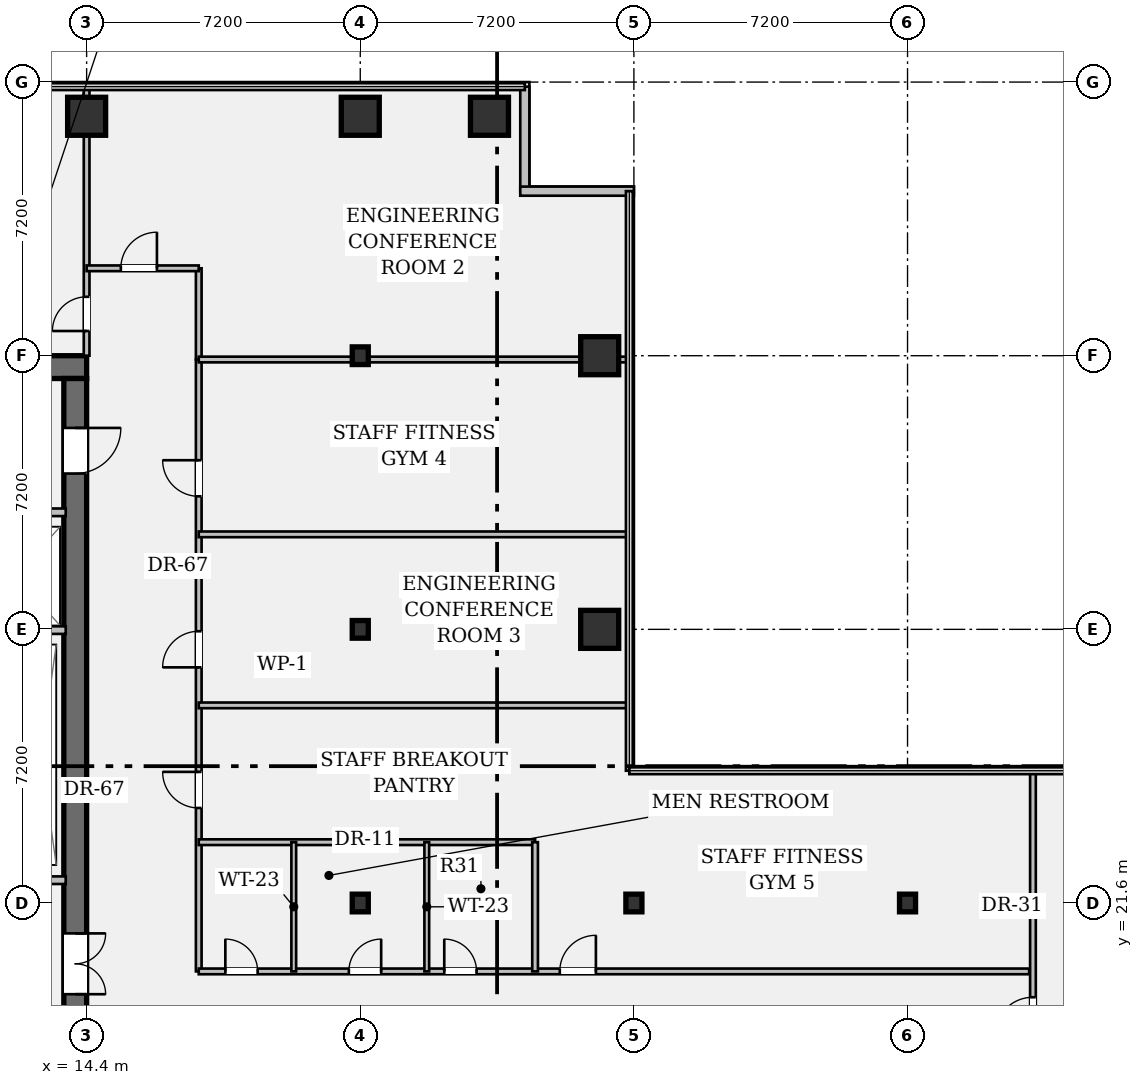
"""IFC4 building model, lengths in metres.
Left out: names, types, materials, properties, quantities, classifications, styles, units other than length and angle.
Written with IfcOpenShell. Run it as: python <this file> out.ifc"""

import sys

from ifc_helpers import new_model, si_unit, direction, frame, frame_2d, origin, origin_2d, place, context, subcontext, project, spatial, rectangle, hollow_rectangle, i_section, extrude, element, fill, save


model = new_model("IFC4")
c1 = context("Model", 3, precision=1e-05, world=origin(), true_north=direction((0.0, 1.0)))
c2 = subcontext(c1, "Body", "Model", "MODEL_VIEW")
j1 = project(units=[si_unit("LENGTHUNIT", "METRE"), si_unit("PLANEANGLEUNIT", "RADIAN")], contexts=[c1])
p1 = place(None, origin())
s1 = spatial("IfcSite", under=j1, at=p1, CompositionType="ELEMENT")
p2 = place(p1, origin())
s2 = spatial("IfcBuilding", under=s1, at=p2, CompositionType="ELEMENT")
p3 = place(p2, frame((0.0, 0.0, 69.65)))
s3 = spatial("IfcBuildingStorey", under=s2, at=p3, CompositionType="ELEMENT", Elevation=69.65)
p4 = place(p3, frame((0.6, 35.7, 0.0), z_axis=(0.0, 0.0, 1.0), x_axis=(1.0, 0.0, 0.0)))
e1 = element("IfcWall", 1, at=p4, inside=s3, PredefinedType="SHEAR", context=c2, shape_type="SweptSolid", body=[
    extrude(rectangle(XDim=13.8, YDim=0.6, at=frame_2d((6.9, 0.0))), origin(), (0.0, 0.0, 1.0), 3.57),
])
p5 = place(p3, frame((14.1, 35.4, 0.0), z_axis=(0.0, 0.0, 1.0), x_axis=(0.0, -1.0, 0.0)))
e2 = element("IfcWall", 2, at=p5, inside=s3, PredefinedType="SHEAR", context=c2, shape_type="SweptSolid", body=[
    extrude(rectangle(XDim=27.6, YDim=0.6, at=frame_2d((13.8, 0.0))), origin(), (0.0, 0.0, 1.0), 3.57),
])
p6 = place(p5, frame((1.3, 0.0, 0.0)))
e3 = element("IfcOpeningElement", 3, at=p6, cuts=e2, PredefinedType="OPENING", context=c2, shape_type="SweptSolid", body=[
    extrude(rectangle(XDim=1.2, YDim=2.15, at=frame_2d((0.6, 1.075))), frame((0.0, 0.312, 0.0), z_axis=(0.0, -1.0, 0.0), x_axis=(1.0, 0.0, 0.0)), (0.0, 0.0, 1.0), 0.624),
])
p7 = place(p5, frame((25.25, 0.0, 0.0)))
e4 = element("IfcOpeningElement", 4, at=p7, cuts=e2, PredefinedType="OPENING", context=c2, shape_type="SweptSolid", body=[
    extrude(rectangle(XDim=1.2, YDim=2.15, at=frame_2d((0.6, 1.075))), frame((0.0, 0.312, 0.0), z_axis=(0.0, -1.0, 0.0), x_axis=(1.0, 0.0, 0.0)), (0.0, 0.0, 1.0), 0.624),
])
p8 = place(p5, frame((14.6, 0.0, 0.0)))
e5 = element("IfcOpeningElement", 5, at=p8, cuts=e2, PredefinedType="OPENING", context=c2, shape_type="SweptSolid", body=[
    extrude(rectangle(XDim=1.6, YDim=2.2, at=frame_2d((0.8, 1.1))), frame((0.0, 0.312, 0.0), z_axis=(0.0, -1.0, 0.0), x_axis=(1.0, 0.0, 0.0)), (0.0, 0.0, 1.0), 0.624),
])
p9 = place(p3, frame((14.4, 42.3, 0.0), z_axis=(0.0, 0.0, 1.0), x_axis=(1.0, 0.0, 0.0)))
e6 = element("IfcColumn", 6, at=p9, inside=s3, PredefinedType="COLUMN", context=c2, shape_type="SweptSolid", body=[
    extrude(hollow_rectangle(XDim=1.0, YDim=1.0, WallThickness=0.065, at=origin_2d()), origin(), (0.0, 0.0, 1.0), 3.57),
])
for number, where, z_axis, x_axis in (
    (7, (21.6, 21.6, 0.0), (0.0, 0.0, 1.0), (1.0, 0.0, 0.0)),
    (8, (21.6, 28.8, 0.0), (0.0, 0.0, 1.0), (1.0, 0.0, 0.0)),
    (9, (21.6, 36.0, 0.0), (0.0, 0.0, 1.0), (1.0, 0.0, 0.0)),
):
    element("IfcColumn", number, at=place(p3, frame(where, z_axis=z_axis, x_axis=x_axis)), inside=s3, PredefinedType="COLUMN", context=c2, shape_type="SweptSolid", body=[
        extrude(i_section(OverallWidth=0.422, OverallDepth=0.465, WebThickness=0.045, FlangeThickness=0.073, FilletRadius=0.018, at=origin_2d()), origin(), (0.0, 0.0, 1.0), 3.57),
    ])
for number, where, z_axis, x_axis in (
    (10, (21.6, 42.3, 0.0), (0.0, 0.0, 1.0), (1.0, 0.0, 0.0)),
    (11, (25.0, 42.3, 0.0), (0.0, 0.0, 1.0), (1.0, 0.0, 0.0)),
    (12, (27.9, 28.8, 0.0), (0.0, 0.0, 1.0), (1.0, 0.0, 0.0)),
    (13, (27.9, 36.0, 0.0), (0.0, 0.0, 1.0), (1.0, 0.0, 0.0)),
):
    element("IfcColumn", number, at=place(p3, frame(where, z_axis=z_axis, x_axis=x_axis)), inside=s3, PredefinedType="COLUMN", context=c2, shape_type="SweptSolid", body=[
        extrude(hollow_rectangle(XDim=1.0, YDim=1.0, WallThickness=0.065, at=origin_2d()), origin(), (0.0, 0.0, 1.0), 3.57),
    ])
for number, where, z_axis, x_axis in (
    (14, (28.8, 21.6, 0.0), (0.0, 0.0, 1.0), (1.0, 0.0, 0.0)),
    (15, (36.0, 21.6, 0.0), (0.0, 0.0, 1.0), (1.0, 0.0, 0.0)),
):
    element("IfcColumn", number, at=place(p3, frame(where, z_axis=z_axis, x_axis=x_axis)), inside=s3, PredefinedType="COLUMN", context=c2, shape_type="SweptSolid", body=[
        extrude(i_section(OverallWidth=0.422, OverallDepth=0.465, WebThickness=0.045, FlangeThickness=0.073, FilletRadius=0.018, at=origin_2d()), origin(), (0.0, 0.0, 1.0), 3.57),
    ])
p10 = place(p3, frame((25.93, 43.08, 0.0), z_axis=(0.0, 0.0, 1.0), x_axis=(0.0, -1.0, 0.0)))
e16 = element("IfcWall", 16, at=p10, inside=s3, PredefinedType="STANDARD", context=c2, shape_type="SweptSolid", body=[
    extrude(rectangle(XDim=2.75, YDim=0.24, at=frame_2d((1.375, 0.0))), origin(), (0.0, 0.0, 1.0), 3.57),
])
p11 = place(p3, frame((25.81, 40.33, 0.0), z_axis=(0.0, 0.0, 1.0), x_axis=(1.0, 0.0, 0.0)))
e17 = element("IfcWall", 17, at=p11, inside=s3, PredefinedType="STANDARD", context=c2, shape_type="SweptSolid", body=[
    extrude(rectangle(XDim=2.99, YDim=0.24, at=frame_2d((1.495, 0.0))), origin(), (0.0, 0.0, 1.0), 3.57),
])
p12 = place(p3, frame((8.7, 31.88, 0.0), z_axis=(0.0, 0.0, 1.0), x_axis=(1.0, 0.0, 0.0)))
e18 = element("IfcWall", 18, at=p12, inside=s3, PredefinedType="PARTITIONING", context=c2, shape_type="SweptSolid", body=[
    extrude(rectangle(XDim=5.15, YDim=0.2, at=frame_2d((2.575, 0.0))), origin(), (0.0, 0.0, 1.0), 3.57),
])
p13 = place(p12, frame((0.75, 0.0, 0.0)))
e19 = element("IfcOpeningElement", 19, at=p13, cuts=e18, PredefinedType="OPENING", context=c2, shape_type="SweptSolid", body=[
    extrude(rectangle(XDim=1.2, YDim=2.2, at=frame_2d((0.6, 1.1))), frame((0.0, 0.112, 0.0), z_axis=(0.0, -1.0, 0.0), x_axis=(1.0, 0.0, 0.0)), (0.0, 0.0, 1.0), 0.224),
])
p14 = place(p12, frame((3.25, 0.0, 0.0)))
e20 = element("IfcOpeningElement", 20, at=p14, cuts=e18, PredefinedType="OPENING", context=c2, shape_type="SweptSolid", body=[
    extrude(rectangle(XDim=1.2, YDim=2.2, at=frame_2d((0.6, 1.1))), frame((0.0, 0.112, 0.0), z_axis=(0.0, -1.0, 0.0), x_axis=(1.0, 0.0, 0.0)), (0.0, 0.0, 1.0), 0.224),
])
p15 = place(p3, frame((8.7, 28.78, 0.0), z_axis=(0.0, 0.0, 1.0), x_axis=(1.0, 0.0, 0.0)))
e21 = element("IfcWall", 21, at=p15, inside=s3, PredefinedType="PARTITIONING", context=c2, shape_type="SweptSolid", body=[
    extrude(rectangle(XDim=5.15, YDim=0.2, at=frame_2d((2.575, 0.0))), origin(), (0.0, 0.0, 1.0), 3.57),
])
p16 = place(p3, frame((7.1, 22.2, 0.0), z_axis=(0.0, 0.0, 1.0), x_axis=(1.0, 0.0, 0.0)))
e22 = element("IfcWall", 22, at=p16, inside=s3, PredefinedType="PARTITIONING", context=c2, shape_type="SweptSolid", body=[
    extrude(rectangle(XDim=6.75, YDim=0.2, at=frame_2d((3.375, 0.0))), origin(), (0.0, 0.0, 1.0), 3.57),
])
p17 = place(p3, frame((17.35, 19.8, 0.0), z_axis=(0.0, 0.0, 1.0), x_axis=(0.0, 1.0, 0.0)))
e23 = element("IfcWall", 23, at=p17, inside=s3, PredefinedType="PARTITIONING", context=c2, shape_type="SweptSolid", body=[
    extrude(rectangle(XDim=16.1, YDim=0.15, at=frame_2d((8.05, 0.0))), origin(), (0.0, 0.0, 1.0), 2.699),
])
p18 = place(p17, frame((4.3, 0.0, 0.0)))
e24 = element("IfcOpeningElement", 24, at=p18, cuts=e23, PredefinedType="OPENING", context=c2, shape_type="SweptSolid", body=[
    extrude(rectangle(XDim=0.95, YDim=2.15, at=frame_2d((0.475, 1.075))), frame((0.0, 0.087, 0.0), z_axis=(0.0, -1.0, 0.0), x_axis=(1.0, 0.0, 0.0)), (0.0, 0.0, 1.0), 0.174),
])
p19 = place(p17, frame((8.0, 0.0, 0.0)))
e25 = element("IfcOpeningElement", 25, at=p19, cuts=e23, PredefinedType="OPENING", context=c2, shape_type="SweptSolid", body=[
    extrude(rectangle(XDim=0.95, YDim=2.15, at=frame_2d((0.475, 1.075))), frame((0.0, 0.087, 0.0), z_axis=(0.0, -1.0, 0.0), x_axis=(1.0, 0.0, 0.0)), (0.0, 0.0, 1.0), 0.174),
])
p20 = place(p17, frame((12.5, 0.0, 0.0)))
e26 = element("IfcOpeningElement", 26, at=p20, cuts=e23, PredefinedType="OPENING", context=c2, shape_type="SweptSolid", body=[
    extrude(rectangle(XDim=0.95, YDim=2.15, at=frame_2d((0.475, 1.075))), frame((0.0, 0.087, 0.0), z_axis=(0.0, -1.0, 0.0), x_axis=(1.0, 0.0, 0.0)), (0.0, 0.0, 1.0), 0.174),
])
p21 = place(p3, frame((17.35, 19.8, 0.0), z_axis=(0.0, 0.0, 1.0), x_axis=(1.0, 0.0, 0.0)))
e27 = element("IfcWall", 27, at=p21, inside=s3, PredefinedType="PARTITIONING", context=c2, shape_type="SweptSolid", body=[
    extrude(rectangle(XDim=21.85, YDim=0.15, at=frame_2d((10.925, 0.0))), origin(), (0.0, 0.0, 1.0), 2.699),
])
p22 = place(p21, frame((0.7, 0.0, 0.0)))
e28 = element("IfcOpeningElement", 28, at=p22, cuts=e27, PredefinedType="OPENING", context=c2, shape_type="SweptSolid", body=[
    extrude(rectangle(XDim=0.85, YDim=2.15, at=frame_2d((0.425, 1.075))), frame((0.0, 0.087, 0.0), z_axis=(0.0, -1.0, 0.0), x_axis=(1.0, 0.0, 0.0)), (0.0, 0.0, 1.0), 0.174),
])
p23 = place(p21, frame((3.95, 0.0, 0.0)))
e29 = element("IfcOpeningElement", 29, at=p23, cuts=e27, PredefinedType="OPENING", context=c2, shape_type="SweptSolid", body=[
    extrude(rectangle(XDim=0.85, YDim=2.15, at=frame_2d((0.425, 1.075))), frame((0.0, 0.087, 0.0), z_axis=(0.0, -1.0, 0.0), x_axis=(1.0, 0.0, 0.0)), (0.0, 0.0, 1.0), 0.174),
])
p24 = place(p21, frame((6.46, 0.0, 0.0)))
e30 = element("IfcOpeningElement", 30, at=p24, cuts=e27, PredefinedType="OPENING", context=c2, shape_type="SweptSolid", body=[
    extrude(rectangle(XDim=0.85, YDim=2.15, at=frame_2d((0.425, 1.075))), frame((0.0, 0.087, 0.0), z_axis=(0.0, -1.0, 0.0), x_axis=(1.0, 0.0, 0.0)), (0.0, 0.0, 1.0), 0.174),
])
p25 = place(p21, frame((9.5, 0.0, 0.0)))
e31 = element("IfcOpeningElement", 31, at=p25, cuts=e27, PredefinedType="OPENING", context=c2, shape_type="SweptSolid", body=[
    extrude(rectangle(XDim=0.95, YDim=2.15, at=frame_2d((0.475, 1.075))), frame((0.0, 0.087, 0.0), z_axis=(0.0, -1.0, 0.0), x_axis=(1.0, 0.0, 0.0)), (0.0, 0.0, 1.0), 0.174),
])
p26 = place(p3, frame((39.3, 0.12, 0.0), z_axis=(0.0, 0.0, 1.0), x_axis=(0.0, 1.0, 0.0)))
e32 = element("IfcWall", 32, at=p26, inside=s3, PredefinedType="PARTITIONING", context=c2, shape_type="SweptSolid", body=[
    extrude(rectangle(XDim=24.96, YDim=0.15, at=frame_2d((12.48, 0.0))), origin(), (0.0, 0.0, 1.0), 2.699),
])
p27 = place(p26, frame((18.0, 0.0, 0.0)))
e33 = element("IfcOpeningElement", 33, at=p27, cuts=e32, PredefinedType="OPENING", context=c2, shape_type="SweptSolid", body=[
    extrude(rectangle(XDim=1.0, YDim=2.15, at=frame_2d((0.5, 1.075))), frame((0.0, 0.087, 0.0), z_axis=(0.0, -1.0, 0.0), x_axis=(1.0, 0.0, 0.0)), (0.0, 0.0, 1.0), 0.174),
])
p28 = place(p3, frame((14.4, 36.0, 0.0), z_axis=(0.0, 0.0, 1.0), x_axis=(0.0, 1.0, 0.0)))
e34 = element("IfcWall", 34, at=p28, inside=s3, PredefinedType="PARTITIONING", context=c2, shape_type="SweptSolid", body=[
    extrude(rectangle(XDim=7.08, YDim=0.15, at=frame_2d((3.54, 0.0))), origin(), (0.0, 0.0, 1.0), 2.699),
])
p29 = place(p28, frame((0.65, 0.0, 0.0)))
e35 = element("IfcOpeningElement", 35, at=p29, cuts=e34, PredefinedType="OPENING", context=c2, shape_type="SweptSolid", body=[
    extrude(rectangle(XDim=0.9, YDim=2.15, at=frame_2d((0.45, 1.075))), frame((0.0, 0.087, 0.0), z_axis=(0.0, -1.0, 0.0), x_axis=(1.0, 0.0, 0.0)), (0.0, 0.0, 1.0), 0.174),
])
p30 = place(p3, frame((17.35, 35.9, 0.0), z_axis=(0.0, 0.0, 1.0), x_axis=(0.0, 1.0, 0.0)))
e36 = element("IfcWall", 36, at=p30, inside=s3, PredefinedType="PARTITIONING", context=c2, shape_type="SweptSolid", body=[
    extrude(rectangle(XDim=2.4, YDim=0.15, at=frame_2d((1.2, 0.0))), origin(), (0.0, 0.0, 1.0), 2.699),
])
p31 = place(p3, frame((14.4, 38.3, 0.0), z_axis=(0.0, 0.0, 1.0), x_axis=(1.0, 0.0, 0.0)))
e37 = element("IfcWall", 37, at=p31, inside=s3, PredefinedType="PARTITIONING", context=c2, shape_type="SweptSolid", body=[
    extrude(rectangle(XDim=2.95, YDim=0.15, at=frame_2d((1.475, 0.0))), origin(), (0.0, 0.0, 1.0), 2.699),
])
p32 = place(p31, frame((0.9, 0.0, 0.0)))
e38 = element("IfcOpeningElement", 38, at=p32, cuts=e37, PredefinedType="OPENING", context=c2, shape_type="SweptSolid", body=[
    extrude(rectangle(XDim=0.95, YDim=2.15, at=frame_2d((0.475, 1.075))), frame((0.0, 0.087, 0.0), z_axis=(0.0, -1.0, 0.0), x_axis=(1.0, 0.0, 0.0)), (0.0, 0.0, 1.0), 0.174),
])
p33 = place(p3, frame((17.35, 35.9, 0.0), z_axis=(0.0, 0.0, 1.0), x_axis=(1.0, 0.0, 0.0)))
e39 = element("IfcWall", 39, at=p33, inside=s3, PredefinedType="PARTITIONING", context=c2, shape_type="SweptSolid", body=[
    extrude(rectangle(XDim=11.33, YDim=0.15, at=frame_2d((5.665, 0.0))), origin(), (0.0, 0.0, 1.0), 2.699),
])
p34 = place(p3, frame((17.35, 23.2, 0.0), z_axis=(0.0, 0.0, 1.0), x_axis=(1.0, 0.0, 0.0)))
e40 = element("IfcWall", 40, at=p34, inside=s3, PredefinedType="PARTITIONING", context=c2, shape_type="SweptSolid", body=[
    extrude(rectangle(XDim=8.85, YDim=0.15, at=frame_2d((4.425, 0.0))), origin(), (0.0, 0.0, 1.0), 2.699),
])
p35 = place(p3, frame((26.2, 19.8, 0.0), z_axis=(0.0, 0.0, 1.0), x_axis=(0.0, 1.0, 0.0)))
e41 = element("IfcWall", 41, at=p35, inside=s3, PredefinedType="PARTITIONING", context=c2, shape_type="SweptSolid", body=[
    extrude(rectangle(XDim=3.4, YDim=0.15, at=frame_2d((1.7, 0.0))), origin(), (0.0, 0.0, 1.0), 2.699),
])
for number, where, z_axis, x_axis in (
    (42, (19.85, 19.8, 0.0), (0.0, 0.0, 1.0), (0.0, 1.0, 0.0)),
    (43, (23.35, 19.8, 0.0), (0.0, 0.0, 1.0), (0.0, 1.0, 0.0)),
):
    element("IfcWall", number, at=place(p3, frame(where, z_axis=z_axis, x_axis=x_axis)), inside=s3, PredefinedType="PARTITIONING", context=c2, shape_type="SweptSolid", body=[
        extrude(rectangle(XDim=3.4, YDim=0.125, at=frame_2d((1.7, 0.0))), origin(), (0.0, 0.0, 1.0), 2.699),
    ])
for number, where, z_axis, x_axis in (
    (44, (17.35, 26.8, 0.0), (0.0, 0.0, 1.0), (1.0, 0.0, 0.0)),
    (45, (17.35, 31.3, 0.0), (0.0, 0.0, 1.0), (1.0, 0.0, 0.0)),
):
    element("IfcWall", number, at=place(p3, frame(where, z_axis=z_axis, x_axis=x_axis)), inside=s3, PredefinedType="PARTITIONING", context=c2, shape_type="SweptSolid", body=[
        extrude(rectangle(XDim=11.33, YDim=0.15, at=frame_2d((5.665, 0.0))), origin(), (0.0, 0.0, 1.0), 2.699),
    ])
p36 = place(p6, origin())
e46 = element("IfcDoor", 46, at=p36, inside=s3, OperationType="SINGLE_SWING_LEFT", PredefinedType="DOOR", context=c2, shape_type="SweptSolid", body=[
    extrude(rectangle(XDim=1.2, YDim=2.15, at=frame_2d((0.6, 1.075))), frame((0.0, 0.025, 0.0), z_axis=(0.0, -1.0, 0.0), x_axis=(1.0, 0.0, 0.0)), (0.0, 0.0, 1.0), 0.05),
])
fill(e3, e46)
p37 = place(p8, origin())
e47 = element("IfcDoor", 47, at=p37, inside=s3, OperationType="DOUBLE_DOOR_SINGLE_SWING", PredefinedType="DOOR", context=c2, shape_type="SweptSolid", body=[
    extrude(rectangle(XDim=1.6, YDim=2.2, at=frame_2d((0.8, 1.1))), frame((0.0, 0.025, 0.0), z_axis=(0.0, -1.0, 0.0), x_axis=(1.0, 0.0, 0.0)), (0.0, 0.0, 1.0), 0.05),
])
fill(e5, e47)
p38 = place(p29, origin())
e48 = element("IfcDoor", 48, at=p38, inside=s3, OperationType="SINGLE_SWING_LEFT", PredefinedType="DOOR", context=c2, shape_type="SweptSolid", body=[
    extrude(rectangle(XDim=0.9, YDim=2.15, at=frame_2d((0.45, 1.075))), frame((0.0, 0.025, 0.0), z_axis=(0.0, -1.0, 0.0), x_axis=(1.0, 0.0, 0.0)), (0.0, 0.0, 1.0), 0.05),
])
fill(e35, e48)
p39 = place(p32, origin())
e49 = element("IfcDoor", 49, at=p39, inside=s3, OperationType="SINGLE_SWING_RIGHT", PredefinedType="DOOR", context=c2, shape_type="SweptSolid", body=[
    extrude(rectangle(XDim=0.95, YDim=2.15, at=frame_2d((0.475, 1.075))), frame((0.0, 0.025, 0.0), z_axis=(0.0, -1.0, 0.0), x_axis=(1.0, 0.0, 0.0)), (0.0, 0.0, 1.0), 0.05),
])
fill(e38, e49)
p40 = place(p22, origin())
e50 = element("IfcDoor", 50, at=p40, inside=s3, OperationType="SINGLE_SWING_LEFT", PredefinedType="DOOR", context=c2, shape_type="SweptSolid", body=[
    extrude(rectangle(XDim=0.85, YDim=2.15, at=frame_2d((0.425, 1.075))), frame((0.0, 0.025, 0.0), z_axis=(0.0, -1.0, 0.0), x_axis=(1.0, 0.0, 0.0)), (0.0, 0.0, 1.0), 0.05),
])
fill(e28, e50)
p41 = place(p23, origin())
e51 = element("IfcDoor", 51, at=p41, inside=s3, OperationType="SINGLE_SWING_RIGHT", PredefinedType="DOOR", context=c2, shape_type="SweptSolid", body=[
    extrude(rectangle(XDim=0.85, YDim=2.15, at=frame_2d((0.425, 1.075))), frame((0.0, 0.025, 0.0), z_axis=(0.0, -1.0, 0.0), x_axis=(1.0, 0.0, 0.0)), (0.0, 0.0, 1.0), 0.05),
])
fill(e29, e51)
p42 = place(p24, origin())
e52 = element("IfcDoor", 52, at=p42, inside=s3, OperationType="SINGLE_SWING_LEFT", PredefinedType="DOOR", context=c2, shape_type="SweptSolid", body=[
    extrude(rectangle(XDim=0.85, YDim=2.15, at=frame_2d((0.425, 1.075))), frame((0.0, 0.025, 0.0), z_axis=(0.0, -1.0, 0.0), x_axis=(1.0, 0.0, 0.0)), (0.0, 0.0, 1.0), 0.05),
])
fill(e30, e52)
p43 = place(p18, origin())
e53 = element("IfcDoor", 53, at=p43, inside=s3, OperationType="SINGLE_SWING_RIGHT", PredefinedType="DOOR", context=c2, shape_type="SweptSolid", body=[
    extrude(rectangle(XDim=0.95, YDim=2.15, at=frame_2d((0.475, 1.075))), frame((0.0, 0.025, 0.0), z_axis=(0.0, -1.0, 0.0), x_axis=(1.0, 0.0, 0.0)), (0.0, 0.0, 1.0), 0.05),
])
fill(e24, e53)
p44 = place(p19, origin())
e54 = element("IfcDoor", 54, at=p44, inside=s3, OperationType="SINGLE_SWING_LEFT", PredefinedType="DOOR", context=c2, shape_type="SweptSolid", body=[
    extrude(rectangle(XDim=0.95, YDim=2.15, at=frame_2d((0.475, 1.075))), frame((0.0, 0.025, 0.0), z_axis=(0.0, -1.0, 0.0), x_axis=(1.0, 0.0, 0.0)), (0.0, 0.0, 1.0), 0.05),
])
fill(e25, e54)
p45 = place(p20, origin())
e55 = element("IfcDoor", 55, at=p45, inside=s3, OperationType="SINGLE_SWING_RIGHT", PredefinedType="DOOR", context=c2, shape_type="SweptSolid", body=[
    extrude(rectangle(XDim=0.95, YDim=2.15, at=frame_2d((0.475, 1.075))), frame((0.0, 0.025, 0.0), z_axis=(0.0, -1.0, 0.0), x_axis=(1.0, 0.0, 0.0)), (0.0, 0.0, 1.0), 0.05),
])
fill(e26, e55)
p46 = place(p25, origin())
e56 = element("IfcDoor", 56, at=p46, inside=s3, OperationType="SINGLE_SWING_RIGHT", PredefinedType="DOOR", context=c2, shape_type="SweptSolid", body=[
    extrude(rectangle(XDim=0.95, YDim=2.15, at=frame_2d((0.475, 1.075))), frame((0.0, 0.025, 0.0), z_axis=(0.0, -1.0, 0.0), x_axis=(1.0, 0.0, 0.0)), (0.0, 0.0, 1.0), 0.05),
])
fill(e31, e56)
p47 = place(p27, origin())
e57 = element("IfcDoor", 57, at=p47, inside=s3, OperationType="SINGLE_SWING_LEFT", PredefinedType="DOOR", context=c2, shape_type="SweptSolid", body=[
    extrude(rectangle(XDim=1.0, YDim=2.15, at=frame_2d((0.5, 1.075))), frame((0.0, 0.025, 0.0), z_axis=(0.0, -1.0, 0.0), x_axis=(1.0, 0.0, 0.0)), (0.0, 0.0, 1.0), 0.05),
])
fill(e33, e57)
save(model, sys.argv[1])
